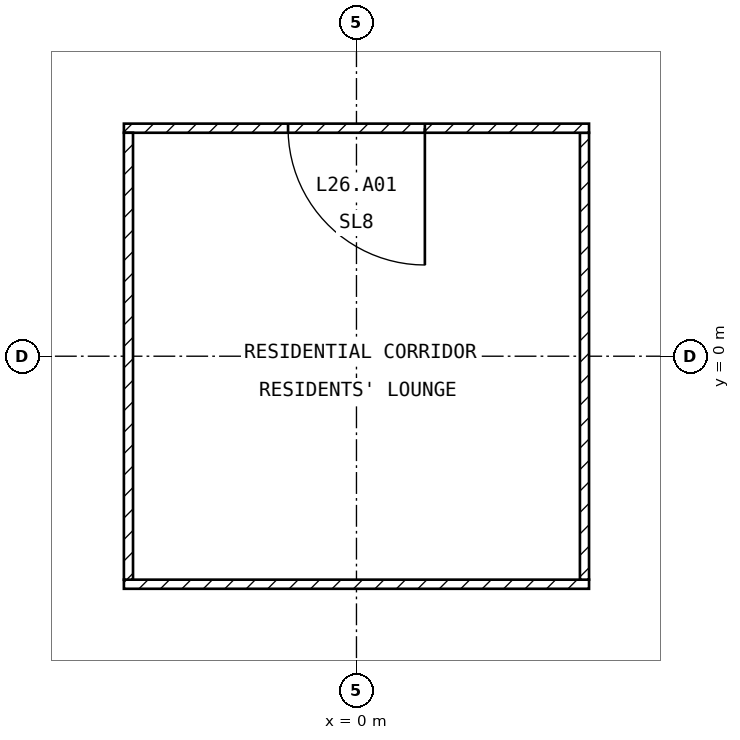
"""IFC4 building model, lengths in metres.
Left out: names, types, materials, properties, quantities, classifications, styles, units other than length and angle.
Written with IfcOpenShell. Run it as: python <this file> out.ifc"""

import sys

from ifc_helpers import new_model, si_unit, direction, frame, frame_2d, origin, place, context, subcontext, project, spatial, rectangle, extrude, element, fill, save


model = new_model("IFC4")
c1 = context("Model", 3, precision=1e-05, world=origin(), true_north=direction((0.0, 1.0)))
c2 = subcontext(c1, "Body", "Model", "MODEL_VIEW")
j1 = project(units=[si_unit("LENGTHUNIT", "METRE"), si_unit("PLANEANGLEUNIT", "RADIAN")], contexts=[c1])
p1 = place(None, origin())
s1 = spatial("IfcSite", under=j1, at=p1, CompositionType="ELEMENT")
p2 = place(p1, origin())
s2 = spatial("IfcBuilding", under=s1, at=p2, CompositionType="ELEMENT")
p3 = place(p2, frame((0.0, 0.0, 112.9)))
s3 = spatial("IfcBuildingStorey", under=s2, at=p3, CompositionType="ELEMENT", Elevation=112.9)
p4 = place(p3, frame((-3.06, -3.0, 0.0), z_axis=(0.0, 0.0, 1.0), x_axis=(1.0, 0.0, 0.0)))
e1 = element("IfcWall", 1, at=p4, inside=s3, PredefinedType="PARTITIONING", context=c2, shape_type="SweptSolid", body=[
    extrude(rectangle(XDim=6.12, YDim=0.12, at=frame_2d((3.06, 0.0))), origin(), (0.0, 0.0, 1.0), 3.25),
])
p5 = place(p3, frame((3.0, -2.94, 0.0), z_axis=(0.0, 0.0, 1.0), x_axis=(0.0, 1.0, 0.0)))
e2 = element("IfcWall", 2, at=p5, inside=s3, PredefinedType="PARTITIONING", context=c2, shape_type="SweptSolid", body=[
    extrude(rectangle(XDim=5.88, YDim=0.12, at=frame_2d((2.94, 0.0))), origin(), (0.0, 0.0, 1.0), 3.25),
])
p6 = place(p3, frame((3.06, 3.0, 0.0), z_axis=(0.0, 0.0, 1.0), x_axis=(-1.0, 0.0, 0.0)))
e3 = element("IfcWall", 3, at=p6, inside=s3, PredefinedType="PARTITIONING", context=c2, shape_type="SweptSolid", body=[
    extrude(rectangle(XDim=6.12, YDim=0.12, at=frame_2d((3.06, 0.0))), origin(), (0.0, 0.0, 1.0), 3.25),
])
p7 = place(p6, frame((2.16, 0.0, 0.0)))
e4 = element("IfcOpeningElement", 4, at=p7, cuts=e3, PredefinedType="OPENING", context=c2, shape_type="SweptSolid", body=[
    extrude(rectangle(XDim=1.8, YDim=2.1, at=frame_2d((0.9, 1.05))), frame((0.0, 0.07, 0.0), z_axis=(0.0, -1.0, 0.0), x_axis=(1.0, 0.0, 0.0)), (0.0, 0.0, 1.0), 0.14),
])
p8 = place(p3, frame((-3.0, 2.94, 0.0), z_axis=(0.0, 0.0, 1.0), x_axis=(0.0, -1.0, 0.0)))
e5 = element("IfcWall", 5, at=p8, inside=s3, PredefinedType="PARTITIONING", context=c2, shape_type="SweptSolid", body=[
    extrude(rectangle(XDim=5.88, YDim=0.12, at=frame_2d((2.94, 0.0))), origin(), (0.0, 0.0, 1.0), 3.25),
])
p9 = place(p7, origin())
e6 = element("IfcDoor", 6, at=p9, inside=s3, OperationType="SINGLE_SWING_LEFT", PredefinedType="DOOR", context=c2, shape_type="SweptSolid", body=[
    extrude(rectangle(XDim=1.8, YDim=2.1, at=frame_2d((0.9, 1.05))), frame((0.0, 0.025, 0.0), z_axis=(0.0, -1.0, 0.0), x_axis=(1.0, 0.0, 0.0)), (0.0, 0.0, 1.0), 0.05),
])
fill(e4, e6)
save(model, sys.argv[1])
